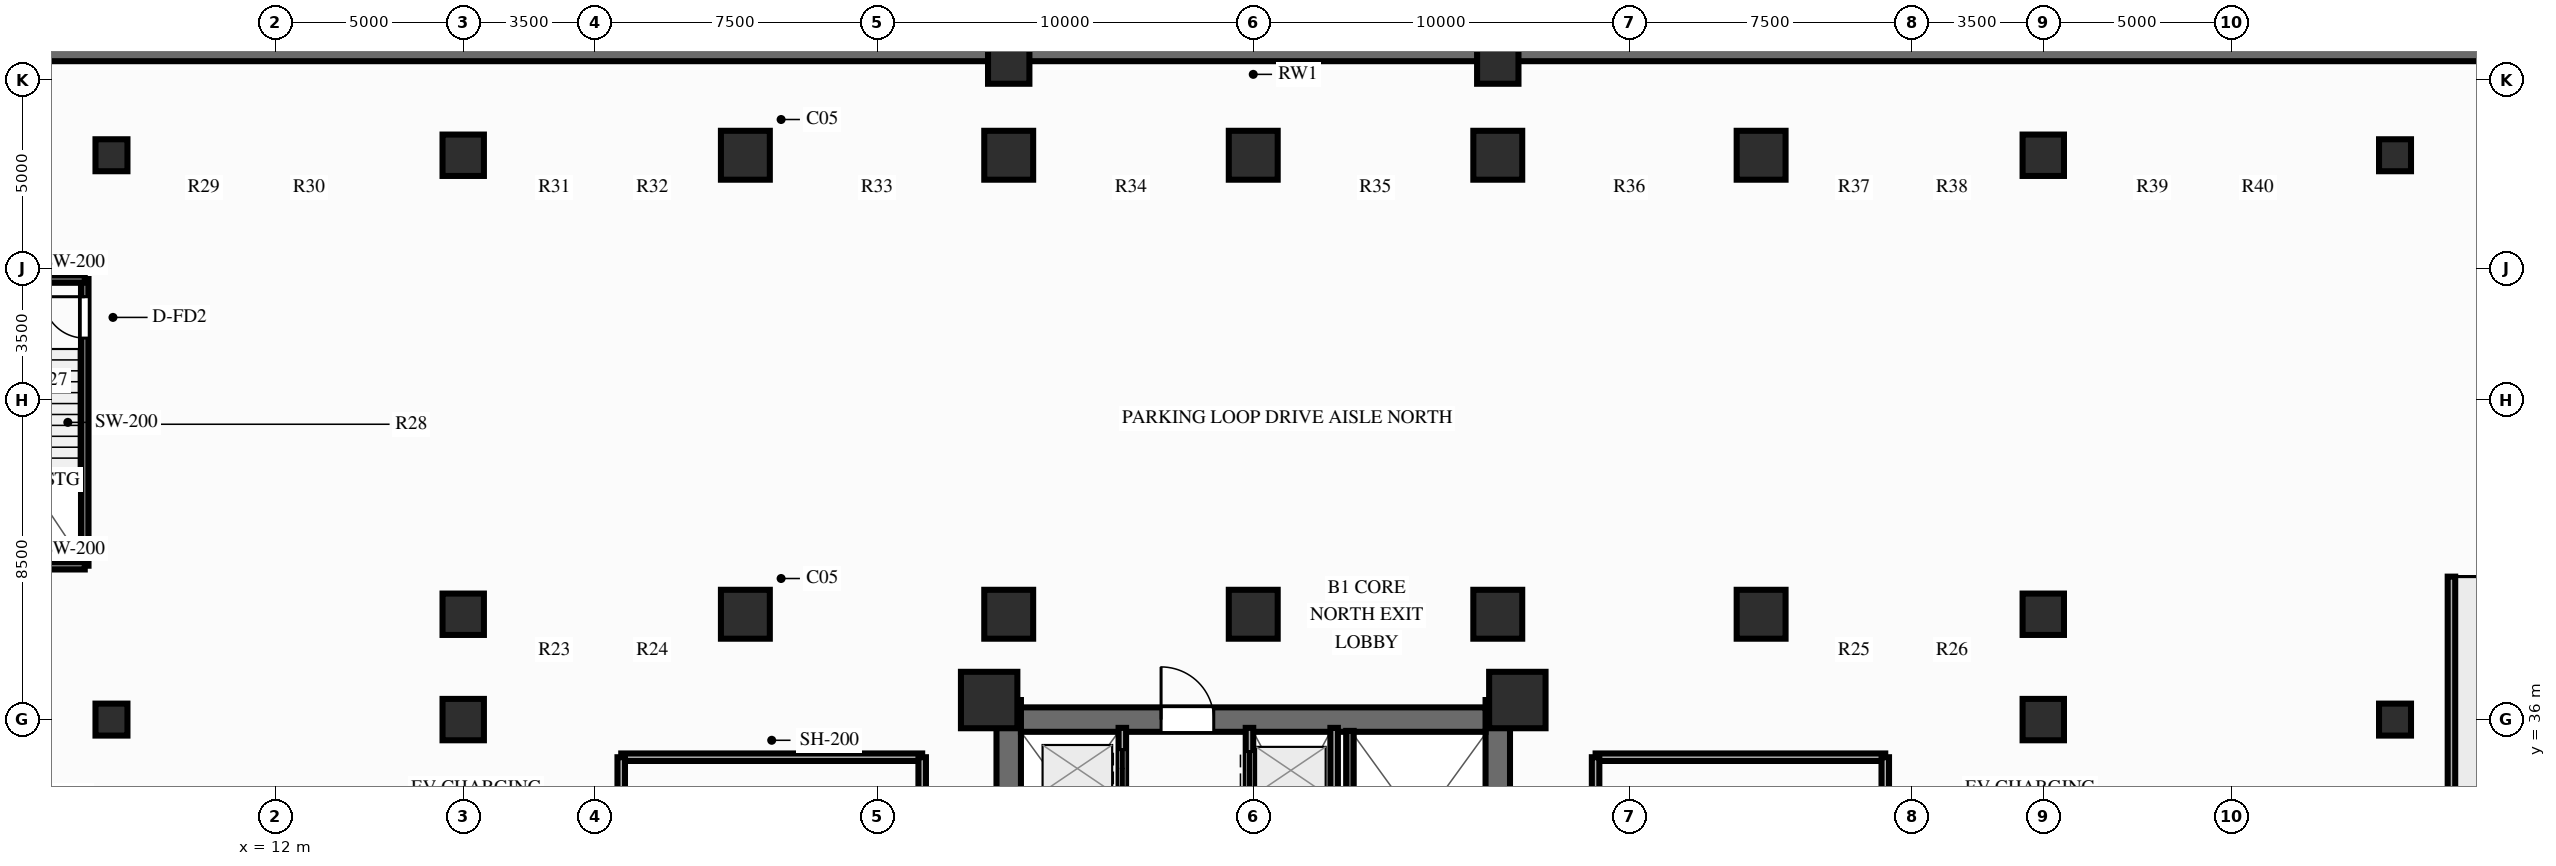
"""IFC4 building model, lengths in metres.
Left out: names, types, materials, properties, quantities, classifications, styles, units other than length and angle.
Written with IfcOpenShell. Run it as: python <this file> out.ifc"""

import sys

from ifc_helpers import new_model, si_unit, direction, frame, frame_2d, origin, origin_2d, place, context, subcontext, project, spatial, rectangle, circle, extrude, source, transform, mapped, element, fill, save


model = new_model("IFC4")
c1 = context("Model", 3, precision=1e-05, world=origin(), true_north=direction((0.0, 1.0)))
c2 = subcontext(c1, "Body", "Model", "MODEL_VIEW")
j1 = project(units=[si_unit("LENGTHUNIT", "METRE"), si_unit("PLANEANGLEUNIT", "RADIAN")], contexts=[c1])
p1 = place(None, origin())
s1 = spatial("IfcSite", under=j1, at=p1, CompositionType="ELEMENT")
p2 = place(p1, origin())
s2 = spatial("IfcBuilding", under=s1, at=p2, CompositionType="ELEMENT")
p3 = place(p2, frame((0.0, 0.0, -4.6)))
s3 = spatial("IfcBuildingStorey", under=s2, at=p3, CompositionType="ELEMENT", Elevation=-4.6)
p4 = place(p3, frame((75.75, 53.75, 0.0), z_axis=(0.0, 0.0, 1.0), x_axis=(-1.0, 0.0, 0.0)))
e1 = element("IfcWall", 1, at=p4, inside=s3, PredefinedType="USERDEFINED", context=c2, shape_type="SweptSolid", body=[
    extrude(rectangle(XDim=75.5, YDim=0.5, at=frame_2d((37.75, 0.0))), origin(), (0.0, 0.0, 1.0), 4.6),
])
p5 = place(p3, frame((31.5, 17.48, 0.0), z_axis=(0.0, 0.0, 1.0), x_axis=(0.0, 1.0, 0.0)))
e2 = element("IfcWall", 2, at=p5, inside=s3, PredefinedType="SHEAR", context=c2, shape_type="SweptSolid", body=[
    extrude(rectangle(XDim=19.04, YDim=0.65, at=frame_2d((9.52, 0.0))), origin(), (0.0, 0.0, 1.0), 4.6),
])
p6 = place(p5, frame((6.32, 0.0, 0.0)))
e3 = element("IfcOpeningElement", 3, at=p6, cuts=e2, PredefinedType="OPENING", context=c2, shape_type="SweptSolid", body=[
    extrude(rectangle(XDim=1.1, YDim=2.15, at=frame_2d((0.55, 1.075))), frame((0.0, 0.337, 0.0), z_axis=(0.0, -1.0, 0.0), x_axis=(1.0, 0.0, 0.0)), (0.0, 0.0, 1.0), 0.674),
])
p7 = place(p3, frame((44.5, 17.48, 0.0), z_axis=(0.0, 0.0, 1.0), x_axis=(0.0, 1.0, 0.0)))
e4 = element("IfcWall", 4, at=p7, inside=s3, PredefinedType="SHEAR", context=c2, shape_type="SweptSolid", body=[
    extrude(rectangle(XDim=19.04, YDim=0.65, at=frame_2d((9.52, 0.0))), origin(), (0.0, 0.0, 1.0), 4.6),
])
p8 = place(p7, frame((12.67, 0.0, 0.0), z_axis=(0.0, 0.0, 1.0), x_axis=(-1.0, 0.0, 0.0)))
e5 = element("IfcOpeningElement", 5, at=p8, cuts=e4, PredefinedType="OPENING", context=c2, shape_type="SweptSolid", body=[
    extrude(rectangle(XDim=1.1, YDim=2.15, at=frame_2d((0.55, 1.075))), frame((0.0, 0.337, 0.0), z_axis=(0.0, -1.0, 0.0), x_axis=(1.0, 0.0, 0.0)), (0.0, 0.0, 1.0), 0.674),
])
p9 = place(p3, frame((31.825, 36.0, 0.0), z_axis=(0.0, 0.0, 1.0), x_axis=(1.0, 0.0, 0.0)))
e6 = element("IfcWall", 6, at=p9, inside=s3, PredefinedType="SHEAR", context=c2, shape_type="SweptSolid", body=[
    extrude(rectangle(XDim=12.35, YDim=0.65, at=frame_2d((6.175, 0.0))), origin(), (0.0, 0.0, 1.0), 4.6),
])
p10 = place(p9, frame((5.125, 0.0, 0.0), z_axis=(0.0, 0.0, 1.0), x_axis=(-1.0, 0.0, 0.0)))
e7 = element("IfcOpeningElement", 7, at=p10, cuts=e6, PredefinedType="OPENING", context=c2, shape_type="SweptSolid", body=[
    extrude(rectangle(XDim=1.4, YDim=2.15, at=frame_2d((0.7, 1.075))), frame((0.0, 0.337, 0.0), z_axis=(0.0, -1.0, 0.0), x_axis=(1.0, 0.0, 0.0)), (0.0, 0.0, 1.0), 0.674),
])
m1 = source(origin(), c2, "Body", "SweptSolid", [
    extrude(rectangle(XDim=1.5, YDim=1.5, at=origin_2d()), origin(), (0.0, 0.0, 1.0), 4.6),
])
for number, where, z_axis, x_axis in (
    (8, (30.98, 36.52, 0.0), (0.0, 0.0, 1.0), (1.0, 0.0, 0.0)),
    (9, (45.02, 36.52, 0.0), (0.0, 0.0, 1.0), (1.0, 0.0, 0.0)),
):
    element("IfcColumn", number, at=place(p3, frame(where, z_axis=z_axis, x_axis=x_axis)), inside=s3, PredefinedType="COLUMN", context=c2, shape_type="MappedRepresentation", body=[
        mapped(m1, transform((0.0, 0.0, 0.0), scale=1.0)),
    ])
m2 = source(origin(), c2, "Body", "SweptSolid", [
    extrude(circle(Radius=0.425, at=origin_2d()), origin(), (0.0, 0.0, 1.0), 4.6),
])
for number, where, z_axis, x_axis in (
    (10, (7.65, 36.0, 0.0), (0.0, 0.0, 1.0), (1.0, 0.0, 0.0)),
    (11, (68.35, 36.0, 0.0), (0.0, 0.0, 1.0), (1.0, 0.0, 0.0)),
    (12, (7.65, 51.0, 0.0), (0.0, 0.0, 1.0), (1.0, 0.0, 0.0)),
    (13, (68.35, 51.0, 0.0), (0.0, 0.0, 1.0), (1.0, 0.0, 0.0)),
):
    element("IfcColumn", number, at=place(p3, frame(where, z_axis=z_axis, x_axis=x_axis)), inside=s3, PredefinedType="COLUMN", context=c2, shape_type="MappedRepresentation", body=[
        mapped(m2, transform((0.0, 0.0, 0.0), scale=1.0)),
    ])
m3 = source(origin(), c2, "Body", "SweptSolid", [
    extrude(rectangle(XDim=1.1, YDim=1.1, at=origin_2d()), origin(), (0.0, 0.0, 1.0), 4.6),
])
for number, where, z_axis, x_axis in (
    (14, (17.0, 36.0, 0.0), (0.0, 0.0, 1.0), (1.0, 0.0, 0.0)),
    (15, (59.0, 36.0, 0.0), (0.0, 0.0, 1.0), (1.0, 0.0, 0.0)),
    (16, (17.0, 38.8, 0.0), (0.0, 0.0, 1.0), (1.0, 0.0, 0.0)),
    (17, (59.0, 38.8, 0.0), (0.0, 0.0, 1.0), (1.0, 0.0, 0.0)),
    (18, (17.0, 51.0, 0.0), (0.0, 0.0, 1.0), (1.0, 0.0, 0.0)),
    (19, (59.0, 51.0, 0.0), (0.0, 0.0, 1.0), (1.0, 0.0, 0.0)),
):
    element("IfcColumn", number, at=place(p3, frame(where, z_axis=z_axis, x_axis=x_axis)), inside=s3, PredefinedType="COLUMN", context=c2, shape_type="MappedRepresentation", body=[
        mapped(m3, transform((0.0, 0.0, 0.0), scale=1.0)),
    ])
m4 = source(origin(), c2, "Body", "SweptSolid", [
    extrude(rectangle(XDim=1.3, YDim=1.3, at=origin_2d()), origin(), (0.0, 0.0, 1.0), 4.6),
])
for number, where, z_axis, x_axis in (
    (20, (24.5, 38.8, 0.0), (0.0, 0.0, 1.0), (1.0, 0.0, 0.0)),
    (21, (24.5, 51.0, 0.0), (0.0, 0.0, 1.0), (1.0, 0.0, 0.0)),
    (22, (31.5, 38.8, 0.0), (0.0, 0.0, 1.0), (1.0, 0.0, 0.0)),
    (23, (31.5, 51.0, 0.0), (0.0, 0.0, 1.0), (1.0, 0.0, 0.0)),
):
    element("IfcColumn", number, at=place(p3, frame(where, z_axis=z_axis, x_axis=x_axis)), inside=s3, PredefinedType="COLUMN", context=c2, shape_type="MappedRepresentation", body=[
        mapped(m4, transform((0.0, 0.0, 0.0), scale=1.0)),
    ])
p11 = place(p3, frame((31.5, 53.45, 0.0), z_axis=(0.0, 0.0, 1.0), x_axis=(1.0, 0.0, 0.0)))
e24 = element("IfcColumn", 24, at=p11, inside=s3, PredefinedType="COLUMN", context=c2, shape_type="MappedRepresentation", body=[
    mapped(m3, transform((0.0, 0.0, 0.0), scale=1.0)),
])
for number, where, z_axis, x_axis in (
    (25, (38.0, 38.8, 0.0), (0.0, 0.0, 1.0), (1.0, 0.0, 0.0)),
    (26, (38.0, 51.0, 0.0), (0.0, 0.0, 1.0), (1.0, 0.0, 0.0)),
    (27, (44.5, 38.8, 0.0), (0.0, 0.0, 1.0), (1.0, 0.0, 0.0)),
    (28, (44.5, 51.0, 0.0), (0.0, 0.0, 1.0), (1.0, 0.0, 0.0)),
):
    element("IfcColumn", number, at=place(p3, frame(where, z_axis=z_axis, x_axis=x_axis)), inside=s3, PredefinedType="COLUMN", context=c2, shape_type="MappedRepresentation", body=[
        mapped(m4, transform((0.0, 0.0, 0.0), scale=1.0)),
    ])
p12 = place(p3, frame((44.5, 53.45, 0.0), z_axis=(0.0, 0.0, 1.0), x_axis=(1.0, 0.0, 0.0)))
e29 = element("IfcColumn", 29, at=p12, inside=s3, PredefinedType="COLUMN", context=c2, shape_type="MappedRepresentation", body=[
    mapped(m3, transform((0.0, 0.0, 0.0), scale=1.0)),
])
for number, where, z_axis, x_axis in (
    (30, (51.5, 38.8, 0.0), (0.0, 0.0, 1.0), (1.0, 0.0, 0.0)),
    (31, (51.5, 51.0, 0.0), (0.0, 0.0, 1.0), (1.0, 0.0, 0.0)),
):
    element("IfcColumn", number, at=place(p3, frame(where, z_axis=z_axis, x_axis=x_axis)), inside=s3, PredefinedType="COLUMN", context=c2, shape_type="MappedRepresentation", body=[
        mapped(m4, transform((0.0, 0.0, 0.0), scale=1.0)),
    ])
p13 = place(p3, frame((40.15, 31.8, 0.0), z_axis=(0.0, 0.0, 1.0), x_axis=(0.0, 1.0, 0.0)))
e32 = element("IfcWall", 32, at=p13, inside=s3, PredefinedType="PARTITIONING", context=c2, shape_type="SweptSolid", body=[
    extrude(rectangle(XDim=3.98, YDim=0.2, at=frame_2d((1.99, 0.0))), origin(), (0.0, 0.0, 1.0), 4.32),
])
p14 = place(p3, frame((40.57, 28.65, 0.0), z_axis=(0.0, 0.0, 1.0), x_axis=(0.0, 1.0, 0.0)))
e33 = element("IfcWall", 33, at=p14, inside=s3, PredefinedType="SOLIDWALL", context=c2, shape_type="SweptSolid", body=[
    extrude(rectangle(XDim=7.05, YDim=0.2, at=frame_2d((3.525, 0.0))), origin(), (0.0, 0.0, 1.0), 4.32),
])
p15 = place(p3, frame((34.52, 25.44, 0.0), z_axis=(0.0, 0.0, 1.0), x_axis=(0.0, 1.0, 0.0)))
e34 = element("IfcWall", 34, at=p15, inside=s3, PredefinedType="PARTITIONING", context=c2, shape_type="SweptSolid", body=[
    extrude(rectangle(XDim=10.34, YDim=0.2, at=frame_2d((5.17, 0.0))), origin(), (0.0, 0.0, 1.0), 4.32),
])
p16 = place(p15, frame((0.32, 0.0, 0.0)))
e35 = element("IfcOpeningElement", 35, at=p16, cuts=e34, PredefinedType="OPENING", context=c2, shape_type="SweptSolid", body=[
    extrude(rectangle(XDim=1.0, YDim=2.15, at=frame_2d((0.5, 1.075))), frame((0.0, 0.112, 0.0), z_axis=(0.0, -1.0, 0.0), x_axis=(1.0, 0.0, 0.0)), (0.0, 0.0, 1.0), 0.224),
])
p17 = place(p15, frame((1.71, 0.0, 0.0)))
e36 = element("IfcOpeningElement", 36, at=p17, cuts=e34, PredefinedType="OPENING", context=c2, shape_type="SweptSolid", body=[
    extrude(rectangle(XDim=1.0, YDim=2.15, at=frame_2d((0.5, 1.075))), frame((0.0, 0.112, 0.0), z_axis=(0.0, -1.0, 0.0), x_axis=(1.0, 0.0, 0.0)), (0.0, 0.0, 1.0), 0.224),
])
p18 = place(p15, frame((3.535, 0.0, 0.0)))
e37 = element("IfcOpeningElement", 37, at=p18, cuts=e34, PredefinedType="OPENING", context=c2, shape_type="SweptSolid", body=[
    extrude(rectangle(XDim=1.0, YDim=2.15, at=frame_2d((0.5, 1.075))), frame((0.0, 0.112, 0.0), z_axis=(0.0, -1.0, 0.0), x_axis=(1.0, 0.0, 0.0)), (0.0, 0.0, 1.0), 0.224),
])
p19 = place(p15, frame((5.135, 0.0, 0.0)))
e38 = element("IfcOpeningElement", 38, at=p19, cuts=e34, PredefinedType="OPENING", context=c2, shape_type="SweptSolid", body=[
    extrude(rectangle(XDim=1.0, YDim=2.15, at=frame_2d((0.5, 1.075))), frame((0.0, 0.112, 0.0), z_axis=(0.0, -1.0, 0.0), x_axis=(1.0, 0.0, 0.0)), (0.0, 0.0, 1.0), 0.224),
])
p20 = place(p15, frame((7.01, 0.0, 0.0)))
e39 = element("IfcOpeningElement", 39, at=p20, cuts=e34, PredefinedType="OPENING", context=c2, shape_type="SweptSolid", body=[
    extrude(rectangle(XDim=1.0, YDim=2.15, at=frame_2d((0.5, 1.075))), frame((0.0, 0.112, 0.0), z_axis=(0.0, -1.0, 0.0), x_axis=(1.0, 0.0, 0.0)), (0.0, 0.0, 1.0), 0.224),
])
p21 = place(p15, frame((8.76, 0.0, 0.0)))
e40 = element("IfcOpeningElement", 40, at=p21, cuts=e34, PredefinedType="OPENING", context=c2, shape_type="SweptSolid", body=[
    extrude(rectangle(XDim=1.0, YDim=2.15, at=frame_2d((0.5, 1.075))), frame((0.0, 0.112, 0.0), z_axis=(0.0, -1.0, 0.0), x_axis=(1.0, 0.0, 0.0)), (0.0, 0.0, 1.0), 0.224),
])
p22 = place(p3, frame((37.9, 25.44, 0.0), z_axis=(0.0, 0.0, 1.0), x_axis=(0.0, 1.0, 0.0)))
e41 = element("IfcWall", 41, at=p22, inside=s3, PredefinedType="PARTITIONING", context=c2, shape_type="SweptSolid", body=[
    extrude(rectangle(XDim=10.34, YDim=0.2, at=frame_2d((5.17, 0.0))), origin(), (0.0, 0.0, 1.0), 4.32),
])
p23 = place(p22, frame((0.32, 0.0, 0.0)))
e42 = element("IfcOpeningElement", 42, at=p23, cuts=e41, PredefinedType="OPENING", context=c2, shape_type="SweptSolid", body=[
    extrude(rectangle(XDim=1.0, YDim=2.15, at=frame_2d((0.5, 1.075))), frame((0.0, 0.112, 0.0), z_axis=(0.0, -1.0, 0.0), x_axis=(1.0, 0.0, 0.0)), (0.0, 0.0, 1.0), 0.224),
])
p24 = place(p22, frame((1.71, 0.0, 0.0)))
e43 = element("IfcOpeningElement", 43, at=p24, cuts=e41, PredefinedType="OPENING", context=c2, shape_type="SweptSolid", body=[
    extrude(rectangle(XDim=1.0, YDim=2.15, at=frame_2d((0.5, 1.075))), frame((0.0, 0.112, 0.0), z_axis=(0.0, -1.0, 0.0), x_axis=(1.0, 0.0, 0.0)), (0.0, 0.0, 1.0), 0.224),
])
p25 = place(p22, frame((3.51, 0.0, 0.0)))
e44 = element("IfcOpeningElement", 44, at=p25, cuts=e41, PredefinedType="OPENING", context=c2, shape_type="SweptSolid", body=[
    extrude(rectangle(XDim=1.0, YDim=2.15, at=frame_2d((0.5, 1.075))), frame((0.0, 0.112, 0.0), z_axis=(0.0, -1.0, 0.0), x_axis=(1.0, 0.0, 0.0)), (0.0, 0.0, 1.0), 0.224),
])
p26 = place(p22, frame((5.01, 0.0, 0.0)))
e45 = element("IfcOpeningElement", 45, at=p26, cuts=e41, PredefinedType="OPENING", context=c2, shape_type="SweptSolid", body=[
    extrude(rectangle(XDim=1.0, YDim=2.15, at=frame_2d((0.5, 1.075))), frame((0.0, 0.112, 0.0), z_axis=(0.0, -1.0, 0.0), x_axis=(1.0, 0.0, 0.0)), (0.0, 0.0, 1.0), 0.224),
])
p27 = place(p22, frame((6.86, 0.0, 0.0)))
e46 = element("IfcOpeningElement", 46, at=p27, cuts=e41, PredefinedType="OPENING", context=c2, shape_type="SweptSolid", body=[
    extrude(rectangle(XDim=1.0, YDim=2.15, at=frame_2d((0.5, 1.075))), frame((0.0, 0.112, 0.0), z_axis=(0.0, -1.0, 0.0), x_axis=(1.0, 0.0, 0.0)), (0.0, 0.0, 1.0), 0.224),
])
p28 = place(p22, frame((8.71, 0.0, 0.0)))
e47 = element("IfcOpeningElement", 47, at=p28, cuts=e41, PredefinedType="OPENING", context=c2, shape_type="SweptSolid", body=[
    extrude(rectangle(XDim=1.0, YDim=2.15, at=frame_2d((0.5, 1.075))), frame((0.0, 0.112, 0.0), z_axis=(0.0, -1.0, 0.0), x_axis=(1.0, 0.0, 0.0)), (0.0, 0.0, 1.0), 0.224),
])
p29 = place(p3, frame((6.94, 40.09, 0.0), z_axis=(0.0, 0.0, 1.0), x_axis=(0.0, 1.0, 0.0)))
e48 = element("IfcWall", 48, at=p29, inside=s3, PredefinedType="SOLIDWALL", context=c2, shape_type="SweptSolid", body=[
    extrude(rectangle(XDim=7.62, YDim=0.2, at=frame_2d((3.81, 0.0))), origin(), (0.0, 0.0, 1.0), 4.32),
])
p30 = place(p29, frame((7.15, 0.0, 0.0), z_axis=(0.0, 0.0, 1.0), x_axis=(-1.0, 0.0, 0.0)))
e49 = element("IfcOpeningElement", 49, at=p30, cuts=e48, PredefinedType="OPENING", context=c2, shape_type="SweptSolid", body=[
    extrude(rectangle(XDim=1.1, YDim=2.15, at=frame_2d((0.55, 1.075))), frame((0.0, 0.112, 0.0), z_axis=(0.0, -1.0, 0.0), x_axis=(1.0, 0.0, 0.0)), (0.0, 0.0, 1.0), 0.224),
])
for number, where, z_axis, x_axis in (
    (50, (3.24, 40.09, 0.0), (0.0, 0.0, 1.0), (1.0, 0.0, 0.0)),
    (51, (3.24, 47.71, 0.0), (0.0, 0.0, 1.0), (1.0, 0.0, 0.0)),
):
    element("IfcWall", number, at=place(p3, frame(where, z_axis=z_axis, x_axis=x_axis)), inside=s3, PredefinedType="SOLIDWALL", context=c2, shape_type="SweptSolid", body=[
        extrude(rectangle(XDim=3.7, YDim=0.2, at=frame_2d((1.85, 0.0))), origin(), (0.0, 0.0, 1.0), 4.32),
    ])
p31 = place(p3, frame((69.85, 8.2, 0.0), z_axis=(0.0, 0.0, 1.0), x_axis=(0.0, 1.0, 0.0)))
e52 = element("IfcWall", 52, at=p31, inside=s3, PredefinedType="PARTITIONING", context=c2, shape_type="SweptSolid", body=[
    extrude(rectangle(XDim=31.6, YDim=0.2, at=frame_2d((15.8, 0.0))), origin(), (0.0, 0.0, 1.0), 4.32),
])
p32 = place(p3, frame((21.2, 35.0, 0.0), z_axis=(0.0, 0.0, 1.0), x_axis=(1.0, 0.0, 0.0)))
e53 = element("IfcWall", 53, at=p32, inside=s3, PredefinedType="PARTITIONING", context=c2, shape_type="SweptSolid", body=[
    extrude(rectangle(XDim=8.0, YDim=0.2, at=frame_2d((4.0, 0.0))), origin(), (0.0, 0.0, 1.0), 4.32),
])
p33 = place(p3, frame((21.2, 27.4, 0.0), z_axis=(0.0, 0.0, 1.0), x_axis=(0.0, 1.0, 0.0)))
e54 = element("IfcWall", 54, at=p33, inside=s3, PredefinedType="PARTITIONING", context=c2, shape_type="SweptSolid", body=[
    extrude(rectangle(XDim=7.6, YDim=0.2, at=frame_2d((3.8, 0.0))), origin(), (0.0, 0.0, 1.0), 4.32),
])
p34 = place(p33, frame((3.25, 0.0, 0.0)))
e55 = element("IfcOpeningElement", 55, at=p34, cuts=e54, PredefinedType="OPENING", context=c2, shape_type="SweptSolid", body=[
    extrude(rectangle(XDim=1.1, YDim=2.15, at=frame_2d((0.55, 1.075))), frame((0.0, 0.112, 0.0), z_axis=(0.0, -1.0, 0.0), x_axis=(1.0, 0.0, 0.0)), (0.0, 0.0, 1.0), 0.224),
])
p35 = place(p3, frame((29.2, 27.4, 0.0), z_axis=(0.0, 0.0, 1.0), x_axis=(0.0, 1.0, 0.0)))
e56 = element("IfcWall", 56, at=p35, inside=s3, PredefinedType="PARTITIONING", context=c2, shape_type="SweptSolid", body=[
    extrude(rectangle(XDim=7.6, YDim=0.2, at=frame_2d((3.8, 0.0))), origin(), (0.0, 0.0, 1.0), 4.32),
])
p36 = place(p3, frame((47.1, 35.0, 0.0), z_axis=(0.0, 0.0, 1.0), x_axis=(1.0, 0.0, 0.0)))
e57 = element("IfcWall", 57, at=p36, inside=s3, PredefinedType="PARTITIONING", context=c2, shape_type="SweptSolid", body=[
    extrude(rectangle(XDim=7.7, YDim=0.2, at=frame_2d((3.85, 0.0))), origin(), (0.0, 0.0, 1.0), 4.32),
])
p37 = place(p3, frame((47.1, 27.4, 0.0), z_axis=(0.0, 0.0, 1.0), x_axis=(0.0, 1.0, 0.0)))
e58 = element("IfcWall", 58, at=p37, inside=s3, PredefinedType="PARTITIONING", context=c2, shape_type="SweptSolid", body=[
    extrude(rectangle(XDim=7.6, YDim=0.2, at=frame_2d((3.8, 0.0))), origin(), (0.0, 0.0, 1.0), 4.32),
])
p38 = place(p3, frame((54.8, 27.4, 0.0), z_axis=(0.0, 0.0, 1.0), x_axis=(0.0, 1.0, 0.0)))
e59 = element("IfcWall", 59, at=p38, inside=s3, PredefinedType="PARTITIONING", context=c2, shape_type="SweptSolid", body=[
    extrude(rectangle(XDim=7.6, YDim=0.2, at=frame_2d((3.8, 0.0))), origin(), (0.0, 0.0, 1.0), 4.32),
])
p39 = place(p38, frame((3.25, 0.0, 0.0)))
e60 = element("IfcOpeningElement", 60, at=p39, cuts=e59, PredefinedType="OPENING", context=c2, shape_type="SweptSolid", body=[
    extrude(rectangle(XDim=1.1, YDim=2.15, at=frame_2d((0.55, 1.075))), frame((0.0, 0.112, 0.0), z_axis=(0.0, -1.0, 0.0), x_axis=(1.0, 0.0, 0.0)), (0.0, 0.0, 1.0), 0.224),
])
m5 = source(origin(), c2, "Body", "SweptSolid", [
    extrude(rectangle(XDim=1.4, YDim=2.15, at=frame_2d((0.7, 1.075))), frame((0.0, 0.025, 0.0), z_axis=(0.0, -1.0, 0.0), x_axis=(1.0, 0.0, 0.0)), (0.0, 0.0, 1.0), 0.05),
])
p40 = place(p10, origin())
e61 = element("IfcDoor", 61, at=p40, inside=s3, OperationType="SINGLE_SWING_RIGHT", PredefinedType="DOOR", context=c2, shape_type="MappedRepresentation", body=[
    mapped(m5, transform((0.0, 0.0, 0.0), scale=1.0)),
])
fill(e7, e61)
m6 = source(origin(), c2, "Body", "SweptSolid", [
    extrude(rectangle(XDim=1.0, YDim=2.15, at=frame_2d((0.5, 1.075))), frame((0.0, 0.025, 0.0), z_axis=(0.0, -1.0, 0.0), x_axis=(1.0, 0.0, 0.0)), (0.0, 0.0, 1.0), 0.05),
])
p41 = place(p21, origin())
e62 = element("IfcDoor", 62, at=p41, inside=s3, OperationType="DOUBLE_DOOR_SLIDING", PredefinedType="DOOR", context=c2, shape_type="MappedRepresentation", body=[
    mapped(m6, transform((0.0, 0.0, 0.0), scale=1.0)),
])
fill(e40, e62)
p42 = place(p28, origin())
e63 = element("IfcDoor", 63, at=p42, inside=s3, OperationType="DOUBLE_DOOR_SLIDING", PredefinedType="DOOR", context=c2, shape_type="MappedRepresentation", body=[
    mapped(m6, transform((0.0, 0.0, 0.0), scale=1.0)),
])
fill(e47, e63)
m7 = source(origin(), c2, "Body", "SweptSolid", [
    extrude(rectangle(XDim=1.1, YDim=2.15, at=frame_2d((0.55, 1.075))), frame((0.0, 0.025, 0.0), z_axis=(0.0, -1.0, 0.0), x_axis=(1.0, 0.0, 0.0)), (0.0, 0.0, 1.0), 0.05),
])
p43 = place(p30, origin())
e64 = element("IfcDoor", 64, at=p43, inside=s3, OperationType="SINGLE_SWING_LEFT", PredefinedType="DOOR", context=c2, shape_type="MappedRepresentation", body=[
    mapped(m7, transform((0.0, 0.0, 0.0), scale=1.0)),
])
fill(e49, e64)
save(model, sys.argv[1])
